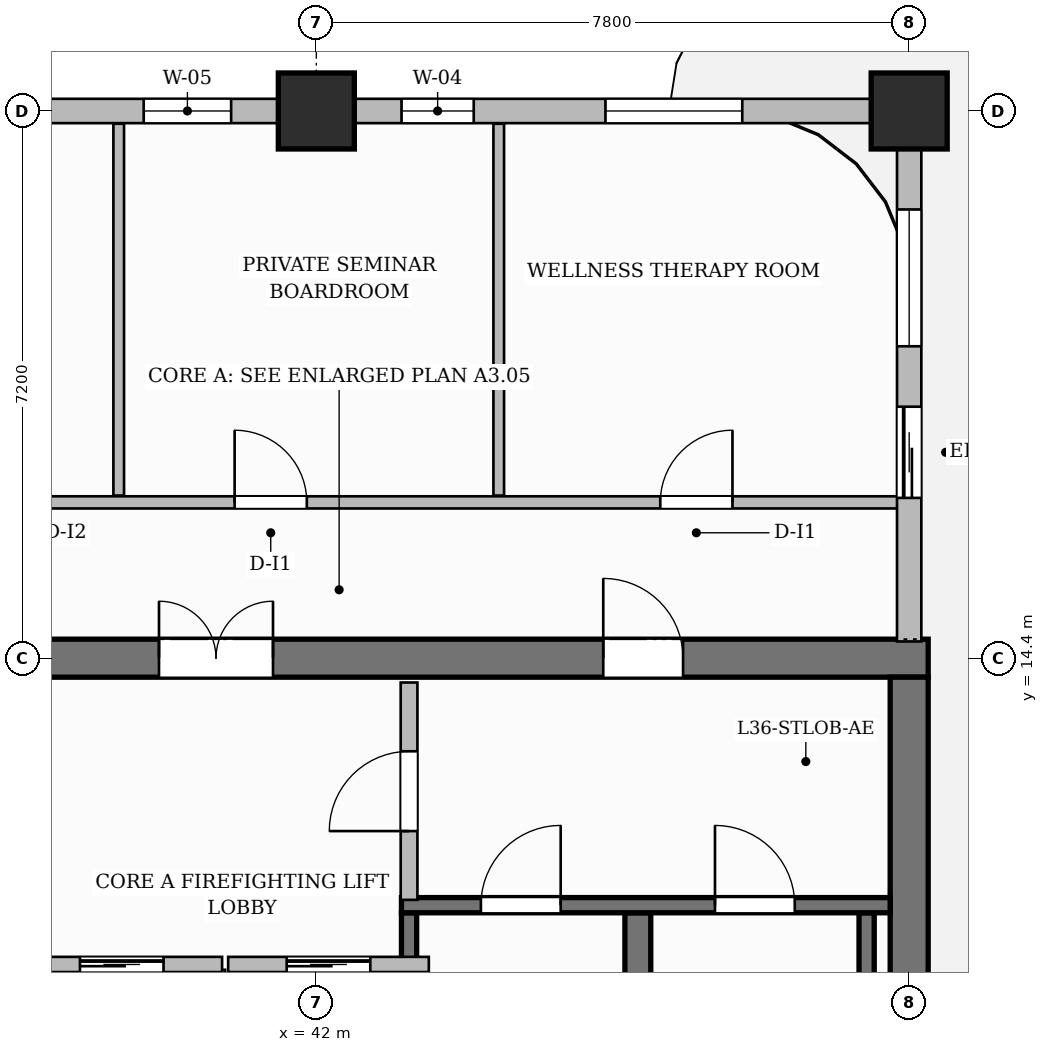
"""IFC4 building model, lengths in metres.
Left out: names, types, materials, properties, quantities, classifications, styles, units other than length and angle.
Written with IfcOpenShell. Run it as: python <this file> out.ifc"""

import sys

from ifc_helpers import new_model, si_unit, direction, frame, frame_2d, origin, origin_2d, place, context, subcontext, project, spatial, rectangle, extrude, source, transform, mapped, element, fill, save


model = new_model("IFC4")
c1 = context("Model", 3, precision=1e-05, world=origin(), true_north=direction((0.0, 1.0)))
c2 = subcontext(c1, "Body", "Model", "MODEL_VIEW")
j1 = project(units=[si_unit("LENGTHUNIT", "METRE"), si_unit("PLANEANGLEUNIT", "RADIAN")], contexts=[c1])
p1 = place(None, origin())
s1 = spatial("IfcSite", under=j1, at=p1, CompositionType="ELEMENT")
p2 = place(p1, origin())
s2 = spatial("IfcBuilding", under=s1, at=p2, CompositionType="ELEMENT")
p3 = place(p2, frame((0.0, 0.0, 145.1)))
s3 = spatial("IfcBuildingStorey", under=s2, at=p3, CompositionType="ELEMENT", Elevation=145.1)
p4 = place(p3, frame((34.55, 14.4, 0.0), z_axis=(0.0, 0.0, 1.0), x_axis=(1.0, 0.0, 0.0)))
e1 = element("IfcWall", 1, at=p4, inside=s3, PredefinedType="SHEAR", context=c2, shape_type="SweptSolid", body=[
    extrude(rectangle(XDim=15.5, YDim=0.5, at=frame_2d((7.75, 0.0))), origin(), (0.0, 0.0, 1.0), 5.2),
])
p5 = place(p4, frame((5.38, 0.0, 0.0)))
e2 = element("IfcOpeningElement", 2, at=p5, cuts=e1, PredefinedType="OPENING", context=c2, shape_type="SweptSolid", body=[
    extrude(rectangle(XDim=1.5, YDim=2.2, at=frame_2d((0.75, 1.1))), frame((0.0, 0.26, 0.0), z_axis=(0.0, -1.0, 0.0), x_axis=(1.0, 0.0, 0.0)), (0.0, 0.0, 1.0), 0.52),
])
p6 = place(p4, frame((1.595, 0.0, 0.0)))
e3 = element("IfcOpeningElement", 3, at=p6, cuts=e1, PredefinedType="OPENING", context=c2, shape_type="SweptSolid", body=[
    extrude(rectangle(XDim=1.05, YDim=2.15, at=frame_2d((0.525, 1.075))), frame((0.0, 0.26, 0.0), z_axis=(0.0, -1.0, 0.0), x_axis=(1.0, 0.0, 0.0)), (0.0, 0.0, 1.0), 0.52),
])
p7 = place(p4, frame((11.225, 0.0, 0.0)))
e4 = element("IfcOpeningElement", 4, at=p7, cuts=e1, PredefinedType="OPENING", context=c2, shape_type="SweptSolid", body=[
    extrude(rectangle(XDim=1.05, YDim=2.15, at=frame_2d((0.525, 1.075))), frame((0.0, 0.26, 0.0), z_axis=(0.0, -1.0, 0.0), x_axis=(1.0, 0.0, 0.0)), (0.0, 0.0, 1.0), 0.52),
])
p8 = place(p3, frame((49.8, 3.85, 0.0), z_axis=(0.0, 0.0, 1.0), x_axis=(0.0, 1.0, 0.0)))
e5 = element("IfcWall", 5, at=p8, inside=s3, PredefinedType="SHEAR", context=c2, shape_type="SweptSolid", body=[
    extrude(rectangle(XDim=10.3, YDim=0.5, at=frame_2d((5.15, 0.0))), origin(), (0.0, 0.0, 1.0), 5.2),
])
m1 = source(origin(), c2, "Body", "SweptSolid", [
    extrude(rectangle(XDim=1.0, YDim=1.0, at=origin_2d()), origin(), (0.0, 0.0, 1.0), 5.2),
])
for number, where, z_axis, x_axis in (
    (6, (42.0, 21.6, 0.0), (0.0, 0.0, 1.0), (1.0, 0.0, 0.0)),
    (7, (49.8, 21.6, 0.0), (0.0, 0.0, 1.0), (1.0, 0.0, 0.0)),
):
    element("IfcColumn", number, at=place(p3, frame(where, z_axis=z_axis, x_axis=x_axis)), inside=s3, PredefinedType="COLUMN", context=c2, shape_type="MappedRepresentation", body=[
        mapped(m1, transform((0.0, 0.0, 0.0), scale=1.0)),
    ])
p9 = place(p3, frame((43.22, 4.1, 0.0), z_axis=(0.0, 0.0, 1.0), x_axis=(0.0, 1.0, 0.0)))
e8 = element("IfcWall", 8, at=p9, inside=s3, PredefinedType="SHEAR", context=c2, shape_type="SweptSolid", body=[
    extrude(rectangle(XDim=6.95, YDim=0.2, at=frame_2d((3.475, 0.0))), origin(), (0.0, 0.0, 1.0), 5.2),
])
p10 = place(p3, frame((46.23, 4.1, 0.0), z_axis=(0.0, 0.0, 1.0), x_axis=(0.0, 1.0, 0.0)))
e9 = element("IfcWall", 9, at=p10, inside=s3, PredefinedType="SHEAR", context=c2, shape_type="SweptSolid", body=[
    extrude(rectangle(XDim=6.95, YDim=0.34, at=frame_2d((3.475, 0.0))), origin(), (0.0, 0.0, 1.0), 5.2),
])
p11 = place(p3, frame((49.24, 4.1, 0.0), z_axis=(0.0, 0.0, 1.0), x_axis=(0.0, 1.0, 0.0)))
e10 = element("IfcWall", 10, at=p11, inside=s3, PredefinedType="SHEAR", context=c2, shape_type="SweptSolid", body=[
    extrude(rectangle(XDim=6.95, YDim=0.2, at=frame_2d((3.475, 0.0))), origin(), (0.0, 0.0, 1.0), 5.2),
])
p12 = place(p3, frame((43.12, 11.15, 0.0), z_axis=(0.0, 0.0, 1.0), x_axis=(1.0, 0.0, 0.0)))
e11 = element("IfcWall", 11, at=p12, inside=s3, PredefinedType="SHEAR", context=c2, shape_type="SweptSolid", body=[
    extrude(rectangle(XDim=6.43, YDim=0.2, at=frame_2d((3.215, 0.0))), origin(), (0.0, 0.0, 1.0), 5.2),
])
p13 = place(p12, frame((1.045, 0.0, 0.0)))
e12 = element("IfcOpeningElement", 12, at=p13, cuts=e11, PredefinedType="OPENING", context=c2, shape_type="SweptSolid", body=[
    extrude(rectangle(XDim=1.05, YDim=2.2, at=frame_2d((0.525, 1.1))), frame((0.0, 0.11, 0.0), z_axis=(0.0, -1.0, 0.0), x_axis=(1.0, 0.0, 0.0)), (0.0, 0.0, 1.0), 0.22),
])
p14 = place(p12, frame((4.125, 0.0, 0.0)))
e13 = element("IfcOpeningElement", 13, at=p14, cuts=e11, PredefinedType="OPENING", context=c2, shape_type="SweptSolid", body=[
    extrude(rectangle(XDim=1.05, YDim=2.2, at=frame_2d((0.525, 1.1))), frame((0.0, 0.11, 0.0), z_axis=(0.0, -1.0, 0.0), x_axis=(1.0, 0.0, 0.0)), (0.0, 0.0, 1.0), 0.22),
])
p15 = place(p3, frame((40.7, 8.12, 0.0), z_axis=(0.0, 0.0, 1.0), x_axis=(0.0, 1.0, 0.0)))
e14 = element("IfcWall", 14, at=p15, inside=s3, PredefinedType="PARTITIONING", context=c2, shape_type="SweptSolid", body=[
    extrude(rectangle(XDim=2.18, YDim=0.2, at=frame_2d((1.09, 0.0))), origin(), (0.0, 0.0, 1.0), 4.95),
])
p16 = place(p3, frame((43.22, 11.22, 0.0), z_axis=(0.0, 0.0, 1.0), x_axis=(0.0, 1.0, 0.0)))
e15 = element("IfcWall", 15, at=p16, inside=s3, PredefinedType="PARTITIONING", context=c2, shape_type="SweptSolid", body=[
    extrude(rectangle(XDim=2.86, YDim=0.22, at=frame_2d((1.43, 0.0))), origin(), (0.0, 0.0, 1.0), 4.95),
])
p17 = place(p16, frame((0.905, 0.0, 0.0)))
e16 = element("IfcOpeningElement", 16, at=p17, cuts=e15, PredefinedType="OPENING", context=c2, shape_type="SweptSolid", body=[
    extrude(rectangle(XDim=1.05, YDim=2.15, at=frame_2d((0.525, 1.075))), frame((0.0, 0.12, 0.0), z_axis=(0.0, -1.0, 0.0), x_axis=(1.0, 0.0, 0.0)), (0.0, 0.0, 1.0), 0.24),
])
p18 = place(p3, frame((32.19, 16.45, 0.0), z_axis=(0.0, 0.0, 1.0), x_axis=(1.0, 0.0, 0.0)))
e17 = element("IfcWall", 17, at=p18, inside=s3, PredefinedType="PARTITIONING", context=c2, shape_type="SweptSolid", body=[
    extrude(rectangle(XDim=17.47, YDim=0.16, at=frame_2d((8.735, 0.0))), origin(), (0.0, 0.0, 1.0), 4.95),
])
p19 = place(p18, frame((1.135, 0.0, 0.0)))
e18 = element("IfcOpeningElement", 18, at=p19, cuts=e17, PredefinedType="OPENING", context=c2, shape_type="SweptSolid", body=[
    extrude(rectangle(XDim=0.85, YDim=2.1, at=frame_2d((0.425, 1.05))), frame((0.0, 0.09, 0.0), z_axis=(0.0, -1.0, 0.0), x_axis=(1.0, 0.0, 0.0)), (0.0, 0.0, 1.0), 0.18),
])
p20 = place(p18, frame((4.76, 0.0, 0.0)))
e19 = element("IfcOpeningElement", 19, at=p20, cuts=e17, PredefinedType="OPENING", context=c2, shape_type="SweptSolid", body=[
    extrude(rectangle(XDim=0.9, YDim=2.15, at=frame_2d((0.45, 1.075))), frame((0.0, 0.09, 0.0), z_axis=(0.0, -1.0, 0.0), x_axis=(1.0, 0.0, 0.0)), (0.0, 0.0, 1.0), 0.18),
])
p21 = place(p18, frame((8.735, 0.0, 0.0)))
e20 = element("IfcOpeningElement", 20, at=p21, cuts=e17, PredefinedType="OPENING", context=c2, shape_type="SweptSolid", body=[
    extrude(rectangle(XDim=0.95, YDim=2.15, at=frame_2d((0.475, 1.075))), frame((0.0, 0.09, 0.0), z_axis=(0.0, -1.0, 0.0), x_axis=(1.0, 0.0, 0.0)), (0.0, 0.0, 1.0), 0.18),
])
p22 = place(p18, frame((14.335, 0.0, 0.0)))
e21 = element("IfcOpeningElement", 21, at=p22, cuts=e17, PredefinedType="OPENING", context=c2, shape_type="SweptSolid", body=[
    extrude(rectangle(XDim=0.95, YDim=2.15, at=frame_2d((0.475, 1.075))), frame((0.0, 0.09, 0.0), z_axis=(0.0, -1.0, 0.0), x_axis=(1.0, 0.0, 0.0)), (0.0, 0.0, 1.0), 0.18),
])
for number, where, z_axis, x_axis in (
    (22, (39.4, 16.54, 0.0), (0.0, 0.0, 1.0), (0.0, 1.0, 0.0)),
    (23, (44.4, 16.54, 0.0), (0.0, 0.0, 1.0), (0.0, 1.0, 0.0)),
):
    element("IfcWall", number, at=place(p3, frame(where, z_axis=z_axis, x_axis=x_axis)), inside=s3, PredefinedType="PARTITIONING", context=c2, shape_type="SweptSolid", body=[
        extrude(rectangle(XDim=4.892, YDim=0.14, at=frame_2d((2.446, 0.0))), origin(), (0.0, 0.0, 1.0), 4.95),
    ])
p23 = place(p3, frame((38.12, 10.37, 0.0), z_axis=(0.0, 0.0, 1.0), x_axis=(1.0, 0.0, 0.0)))
e24 = element("IfcWall", 24, at=p23, inside=s3, PredefinedType="PARTITIONING", context=c2, shape_type="SweptSolid", body=[
    extrude(rectangle(XDim=2.64, YDim=0.2, at=frame_2d((1.32, 0.0))), origin(), (0.0, 0.0, 1.0), 4.95),
])
p24 = place(p23, frame((0.77, 0.0, 0.0)))
e25 = element("IfcOpeningElement", 25, at=p24, cuts=e24, PredefinedType="OPENING", context=c2, shape_type="SweptSolid", body=[
    extrude(rectangle(XDim=1.1, YDim=2.2, at=frame_2d((0.55, 1.1))), frame((0.0, 0.11, 0.0), z_axis=(0.0, -1.0, 0.0), x_axis=(1.0, 0.0, 0.0)), (0.0, 0.0, 1.0), 0.22),
])
p25 = place(p3, frame((40.84, 10.37, 0.0), z_axis=(0.0, 0.0, 1.0), x_axis=(1.0, 0.0, 0.0)))
e26 = element("IfcWall", 26, at=p25, inside=s3, PredefinedType="PARTITIONING", context=c2, shape_type="SweptSolid", body=[
    extrude(rectangle(XDim=2.64, YDim=0.2, at=frame_2d((1.32, 0.0))), origin(), (0.0, 0.0, 1.0), 4.95),
])
p26 = place(p25, frame((0.77, 0.0, 0.0)))
e27 = element("IfcOpeningElement", 27, at=p26, cuts=e26, PredefinedType="OPENING", context=c2, shape_type="SweptSolid", body=[
    extrude(rectangle(XDim=1.1, YDim=2.2, at=frame_2d((0.55, 1.1))), frame((0.0, 0.11, 0.0), z_axis=(0.0, -1.0, 0.0), x_axis=(1.0, 0.0, 0.0)), (0.0, 0.0, 1.0), 0.22),
])
p27 = place(p3, frame((49.8, 14.62, 0.0), z_axis=(0.0, 0.0, 1.0), x_axis=(0.0, 1.0, 0.0)))
e28 = element("IfcWall", 28, at=p27, inside=s3, PredefinedType="SOLIDWALL", context=c2, shape_type="SweptSolid", body=[
    extrude(rectangle(XDim=6.93, YDim=0.32, at=frame_2d((3.465, 0.0))), origin(), (0.0, 0.0, 1.0), 4.335),
])
p28 = place(p27, frame((1.889, 0.0, 0.0)))
e29 = element("IfcOpeningElement", 29, at=p28, cuts=e28, PredefinedType="OPENING", context=c2, shape_type="SweptSolid", body=[
    extrude(rectangle(XDim=1.2, YDim=2.2, at=frame_2d((0.6, 1.1))), frame((0.0, 0.17, 0.0), z_axis=(0.0, -1.0, 0.0), x_axis=(1.0, 0.0, 0.0)), (0.0, 0.0, 1.0), 0.34),
])
p29 = place(p27, frame((3.884, 0.0, 0.8)))
e30 = element("IfcOpeningElement", 30, at=p29, cuts=e28, PredefinedType="OPENING", context=c2, shape_type="SweptSolid", body=[
    extrude(rectangle(XDim=1.8, YDim=1.85, at=frame_2d((0.9, 0.925))), frame((0.0, 0.17, 0.0), z_axis=(0.0, -1.0, 0.0), x_axis=(1.0, 0.0, 0.0)), (0.0, 0.0, 1.0), 0.34),
])
p30 = place(p3, frame((34.8, 21.6, 0.0), z_axis=(0.0, 0.0, 1.0), x_axis=(1.0, 0.0, 0.0)))
e31 = element("IfcWall", 31, at=p30, inside=s3, PredefinedType="SOLIDWALL", context=c2, shape_type="SweptSolid", body=[
    extrude(rectangle(XDim=15.0, YDim=0.32, at=frame_2d((7.5, 0.0))), origin(), (0.0, 0.0, 1.0), 4.335),
])
p31 = place(p30, frame((1.796, 0.0, 0.8)))
e32 = element("IfcOpeningElement", 32, at=p31, cuts=e31, PredefinedType="OPENING", context=c2, shape_type="SweptSolid", body=[
    extrude(rectangle(XDim=1.8, YDim=1.85, at=frame_2d((0.9, 0.925))), frame((0.0, 0.17, 0.0), z_axis=(0.0, -1.0, 0.0), x_axis=(1.0, 0.0, 0.0)), (0.0, 0.0, 1.0), 0.34),
])
p32 = place(p30, frame((4.929, 0.0, 0.8)))
e33 = element("IfcOpeningElement", 33, at=p32, cuts=e31, PredefinedType="OPENING", context=c2, shape_type="SweptSolid", body=[
    extrude(rectangle(XDim=1.15, YDim=1.8, at=frame_2d((0.575, 0.9))), frame((0.0, 0.17, 0.0), z_axis=(0.0, -1.0, 0.0), x_axis=(1.0, 0.0, 0.0)), (0.0, 0.0, 1.0), 0.34),
])
p33 = place(p30, frame((8.321, 0.0, 0.8)))
e34 = element("IfcOpeningElement", 34, at=p33, cuts=e31, PredefinedType="OPENING", context=c2, shape_type="SweptSolid", body=[
    extrude(rectangle(XDim=0.95, YDim=1.75, at=frame_2d((0.475, 0.875))), frame((0.0, 0.17, 0.0), z_axis=(0.0, -1.0, 0.0), x_axis=(1.0, 0.0, 0.0)), (0.0, 0.0, 1.0), 0.34),
])
p34 = place(p30, frame((11.004, 0.0, 0.8)))
e35 = element("IfcOpeningElement", 35, at=p34, cuts=e31, PredefinedType="OPENING", context=c2, shape_type="SweptSolid", body=[
    extrude(rectangle(XDim=1.8, YDim=1.85, at=frame_2d((0.9, 0.925))), frame((0.0, 0.17, 0.0), z_axis=(0.0, -1.0, 0.0), x_axis=(1.0, 0.0, 0.0)), (0.0, 0.0, 1.0), 0.34),
])
m2 = source(origin(), c2, "Body", "SweptSolid", [
    extrude(rectangle(XDim=1.05, YDim=2.2, at=frame_2d((0.525, 1.1))), frame((0.0, 0.025, 0.0), z_axis=(0.0, -1.0, 0.0), x_axis=(1.0, 0.0, 0.0)), (0.0, 0.0, 1.0), 0.05),
])
p35 = place(p13, origin())
e36 = element("IfcDoor", 36, at=p35, inside=s3, OperationType="SINGLE_SWING_RIGHT", PredefinedType="DOOR", context=c2, shape_type="MappedRepresentation", body=[
    mapped(m2, transform((0.0, 0.0, 0.0), scale=1.0)),
])
fill(e12, e36)
p36 = place(p14, origin())
e37 = element("IfcDoor", 37, at=p36, inside=s3, OperationType="SINGLE_SWING_LEFT", PredefinedType="DOOR", context=c2, shape_type="MappedRepresentation", body=[
    mapped(m2, transform((0.0, 0.0, 0.0), scale=1.0)),
])
fill(e13, e37)
m3 = source(origin(), c2, "Body", "SweptSolid", [
    extrude(rectangle(XDim=1.05, YDim=2.15, at=frame_2d((0.525, 1.075))), frame((0.0, 0.025, 0.0), z_axis=(0.0, -1.0, 0.0), x_axis=(1.0, 0.0, 0.0)), (0.0, 0.0, 1.0), 0.05),
])
p37 = place(p17, origin())
e38 = element("IfcDoor", 38, at=p37, inside=s3, OperationType="SINGLE_SWING_LEFT", PredefinedType="DOOR", context=c2, shape_type="MappedRepresentation", body=[
    mapped(m3, transform((0.0, 0.0, 0.0), scale=1.0)),
])
fill(e16, e38)
m4 = source(origin(), c2, "Body", "SweptSolid", [
    extrude(rectangle(XDim=1.5, YDim=2.2, at=frame_2d((0.75, 1.1))), frame((0.0, 0.025, 0.0), z_axis=(0.0, -1.0, 0.0), x_axis=(1.0, 0.0, 0.0)), (0.0, 0.0, 1.0), 0.05),
])
p38 = place(p5, origin())
e39 = element("IfcDoor", 39, at=p38, inside=s3, OperationType="DOUBLE_DOOR_SINGLE_SWING", PredefinedType="DOOR", context=c2, shape_type="MappedRepresentation", body=[
    mapped(m4, transform((0.0, 0.0, 0.0), scale=1.0)),
])
fill(e2, e39)
p39 = place(p7, origin())
e40 = element("IfcDoor", 40, at=p39, inside=s3, OperationType="SINGLE_SWING_LEFT", PredefinedType="DOOR", context=c2, shape_type="MappedRepresentation", body=[
    mapped(m3, transform((0.0, 0.0, 0.0), scale=1.0)),
])
fill(e4, e40)
m5 = source(origin(), c2, "Body", "SweptSolid", [
    extrude(rectangle(XDim=0.95, YDim=2.15, at=frame_2d((0.475, 1.075))), frame((0.0, 0.025, 0.0), z_axis=(0.0, -1.0, 0.0), x_axis=(1.0, 0.0, 0.0)), (0.0, 0.0, 1.0), 0.05),
])
p40 = place(p21, origin())
e41 = element("IfcDoor", 41, at=p40, inside=s3, OperationType="SINGLE_SWING_LEFT", PredefinedType="DOOR", context=c2, shape_type="MappedRepresentation", body=[
    mapped(m5, transform((0.0, 0.0, 0.0), scale=1.0)),
])
fill(e20, e41)
p41 = place(p22, origin())
e42 = element("IfcDoor", 42, at=p41, inside=s3, OperationType="SINGLE_SWING_RIGHT", PredefinedType="DOOR", context=c2, shape_type="MappedRepresentation", body=[
    mapped(m5, transform((0.0, 0.0, 0.0), scale=1.0)),
])
fill(e21, e42)
m6 = source(origin(), c2, "Body", "SweptSolid", [
    extrude(rectangle(XDim=1.1, YDim=2.2, at=frame_2d((0.55, 1.1))), frame((0.0, 0.025, 0.0), z_axis=(0.0, -1.0, 0.0), x_axis=(1.0, 0.0, 0.0)), (0.0, 0.0, 1.0), 0.05),
])
p42 = place(p24, origin())
e43 = element("IfcDoor", 43, at=p42, inside=s3, OperationType="SLIDING_TO_LEFT", PredefinedType="DOOR", context=c2, shape_type="MappedRepresentation", body=[
    mapped(m6, transform((0.0, 0.0, 0.0), scale=1.0)),
])
fill(e25, e43)
p43 = place(p26, origin())
e44 = element("IfcDoor", 44, at=p43, inside=s3, OperationType="SLIDING_TO_LEFT", PredefinedType="DOOR", context=c2, shape_type="MappedRepresentation", body=[
    mapped(m6, transform((0.0, 0.0, 0.0), scale=1.0)),
])
fill(e27, e44)
m7 = source(origin(), c2, "Body", "SweptSolid", [
    extrude(rectangle(XDim=1.2, YDim=2.2, at=frame_2d((0.6, 1.1))), frame((0.0, 0.025, 0.0), z_axis=(0.0, -1.0, 0.0), x_axis=(1.0, 0.0, 0.0)), (0.0, 0.0, 1.0), 0.05),
])
p44 = place(p28, origin())
e45 = element("IfcDoor", 45, at=p44, inside=s3, OperationType="SLIDING_TO_LEFT", PredefinedType="DOOR", context=c2, shape_type="MappedRepresentation", body=[
    mapped(m7, transform((0.0, 0.0, 0.0), scale=1.0)),
])
fill(e29, e45)
m8 = source(origin(), c2, "Body", "SweptSolid", [
    extrude(rectangle(XDim=1.8, YDim=1.85, at=frame_2d((0.9, 0.925))), frame((0.0, 0.03, 0.0), z_axis=(0.0, -1.0, 0.0), x_axis=(1.0, 0.0, 0.0)), (0.0, 0.0, 1.0), 0.06),
])
p45 = place(p29, origin())
e46 = element("IfcWindow", 46, at=p45, inside=s3, PartitioningType="DOUBLE_PANEL_VERTICAL", PredefinedType="WINDOW", context=c2, shape_type="MappedRepresentation", body=[
    mapped(m8, transform((0.0, 0.0, 0.0), scale=1.0)),
])
fill(e30, e46)
m9 = source(origin(), c2, "Body", "SweptSolid", [
    extrude(rectangle(XDim=1.15, YDim=1.8, at=frame_2d((0.575, 0.9))), frame((0.0, 0.03, 0.0), z_axis=(0.0, -1.0, 0.0), x_axis=(1.0, 0.0, 0.0)), (0.0, 0.0, 1.0), 0.06),
])
p46 = place(p32, origin())
e47 = element("IfcWindow", 47, at=p46, inside=s3, PartitioningType="SINGLE_PANEL", PredefinedType="WINDOW", context=c2, shape_type="MappedRepresentation", body=[
    mapped(m9, transform((0.0, 0.0, 0.0), scale=1.0)),
])
fill(e33, e47)
m10 = source(origin(), c2, "Body", "SweptSolid", [
    extrude(rectangle(XDim=0.95, YDim=1.75, at=frame_2d((0.475, 0.875))), frame((0.0, 0.03, 0.0), z_axis=(0.0, -1.0, 0.0), x_axis=(1.0, 0.0, 0.0)), (0.0, 0.0, 1.0), 0.06),
])
p47 = place(p33, origin())
e48 = element("IfcWindow", 48, at=p47, inside=s3, PartitioningType="SINGLE_PANEL", PredefinedType="WINDOW", context=c2, shape_type="MappedRepresentation", body=[
    mapped(m10, transform((0.0, 0.0, 0.0), scale=1.0)),
])
fill(e34, e48)
p48 = place(p34, origin())
e49 = element("IfcWindow", 49, at=p48, inside=s3, PartitioningType="DOUBLE_PANEL_VERTICAL", PredefinedType="WINDOW", context=c2, shape_type="MappedRepresentation", body=[
    mapped(m8, transform((0.0, 0.0, 0.0), scale=1.0)),
])
fill(e35, e49)
save(model, sys.argv[1])
